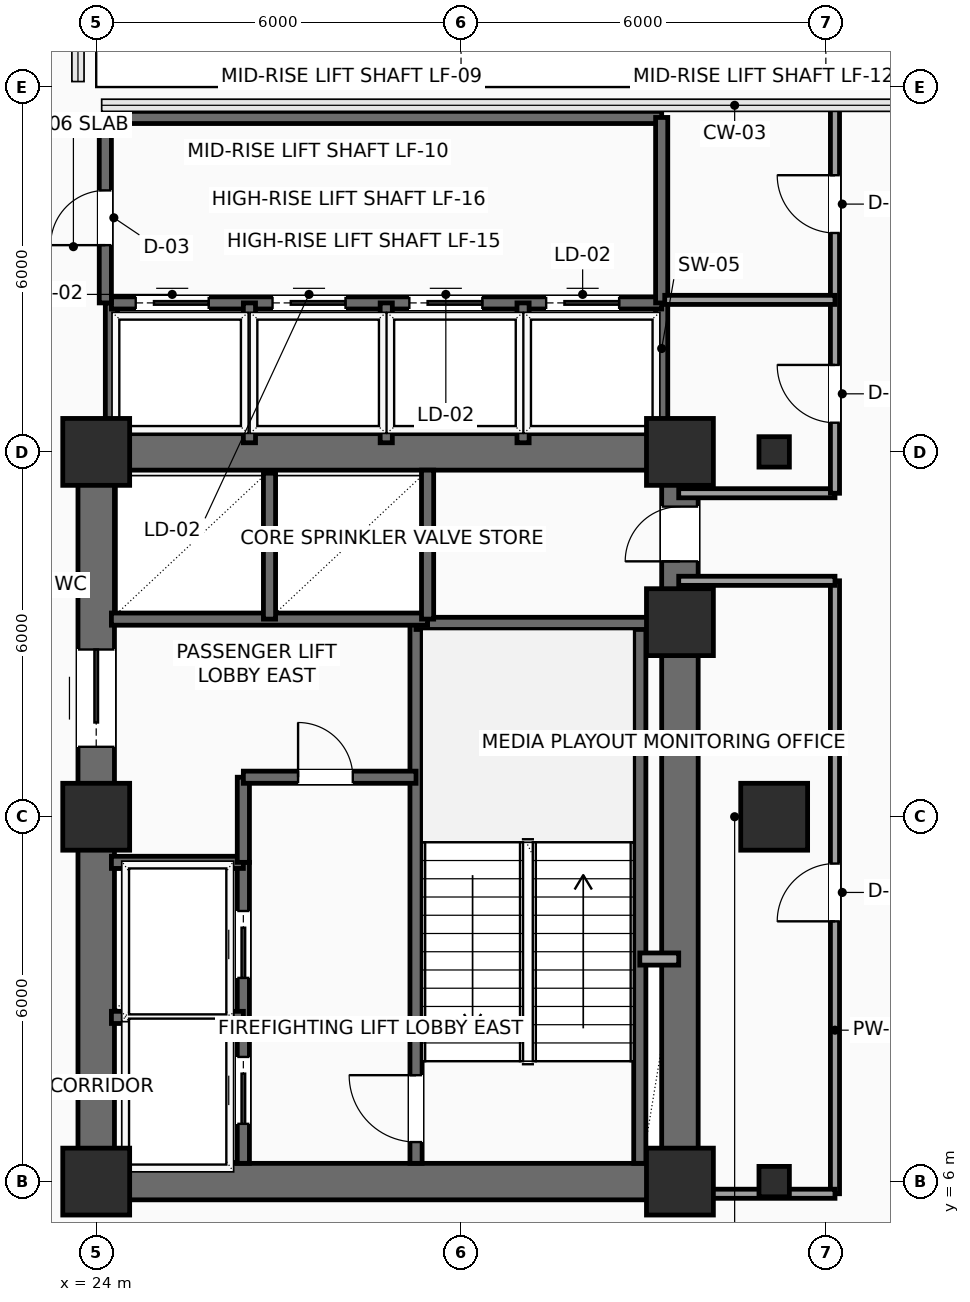
"""IFC4 building model, lengths in metres.
Left out: names, types, materials, properties, quantities, classifications, styles, units other than length and angle.
Written with IfcOpenShell. Run it as: python <this file> out.ifc"""

import sys

from ifc_helpers import new_model, si_unit, direction, frame, frame_2d, origin, origin_2d, place, context, subcontext, project, spatial, rectangle, hollow_rectangle, extrude, element, fill, save


model = new_model("IFC4")
c1 = context("Model", 3, precision=1e-05, world=origin(), true_north=direction((0.0, 1.0)))
c2 = subcontext(c1, "Body", "Model", "MODEL_VIEW")
j1 = project(units=[si_unit("LENGTHUNIT", "METRE"), si_unit("PLANEANGLEUNIT", "RADIAN")], contexts=[c1])
p1 = place(None, origin())
s1 = spatial("IfcSite", under=j1, at=p1, CompositionType="ELEMENT")
p2 = place(p1, origin())
s2 = spatial("IfcBuilding", under=s1, at=p2, CompositionType="ELEMENT")
p3 = place(p2, frame((0.0, 0.0, 156.9)))
s3 = spatial("IfcBuildingStorey", under=s2, at=p3, CompositionType="ELEMENT", Elevation=156.9)
for number, where, z_axis, x_axis in (
    (1, (24.0, 6.0, 0.0), (0.0, 0.0, 1.0), (1.0, 0.0, 0.0)),
    (2, (24.0, 12.0, 0.0), (0.0, 0.0, 1.0), (1.0, 0.0, 0.0)),
    (3, (24.0, 18.0, 0.0), (0.0, 0.0, 1.0), (1.0, 0.0, 0.0)),
    (4, (33.6, 6.0, 0.0), (0.0, 0.0, 1.0), (1.0, 0.0, 0.0)),
    (5, (33.6, 15.2, 0.0), (0.0, 0.0, 1.0), (1.0, 0.0, 0.0)),
    (6, (33.6, 18.0, 0.0), (0.0, 0.0, 1.0), (1.0, 0.0, 0.0)),
):
    element("IfcColumn", number, at=place(p3, frame(where, z_axis=z_axis, x_axis=x_axis)), inside=s3, PredefinedType="COLUMN", context=c2, shape_type="SweptSolid", body=[
        extrude(rectangle(XDim=1.1, YDim=1.1, at=origin_2d()), origin(), (0.0, 0.0, 1.0), 3.75),
    ])
p4 = place(p3, frame((35.15, 6.0, 0.0), z_axis=(0.0, 0.0, 1.0), x_axis=(1.0, 0.0, 0.0)))
e7 = element("IfcColumn", 7, at=p4, inside=s3, PredefinedType="COLUMN", context=c2, shape_type="SweptSolid", body=[
    extrude(hollow_rectangle(XDim=0.5, YDim=0.5, WallThickness=0.025, InnerFilletRadius=0.025, OuterFilletRadius=0.04, at=origin_2d()), origin(), (0.0, 0.0, 1.0), 3.75),
])
p5 = place(p3, frame((35.15, 12.0, 0.0), z_axis=(0.0, 0.0, 1.0), x_axis=(1.0, 0.0, 0.0)))
e8 = element("IfcColumn", 8, at=p5, inside=s3, PredefinedType="COLUMN", context=c2, shape_type="SweptSolid", body=[
    extrude(rectangle(XDim=1.1, YDim=1.1, at=origin_2d()), origin(), (0.0, 0.0, 1.0), 3.75),
])
p6 = place(p3, frame((35.15, 18.0, 0.0), z_axis=(0.0, 0.0, 1.0), x_axis=(1.0, 0.0, 0.0)))
e9 = element("IfcColumn", 9, at=p6, inside=s3, PredefinedType="COLUMN", context=c2, shape_type="SweptSolid", body=[
    extrude(hollow_rectangle(XDim=0.5, YDim=0.5, WallThickness=0.025, InnerFilletRadius=0.025, OuterFilletRadius=0.04, at=origin_2d()), origin(), (0.0, 0.0, 1.0), 3.75),
])
for number, where, z_axis, x_axis in (
    (10, (24.0, 6.0, 0.0), (0.0, 0.0, 1.0), (1.0, 0.0, 0.0)),
    (11, (24.0, 18.0, 0.0), (0.0, 0.0, 1.0), (1.0, 0.0, 0.0)),
):
    element("IfcWall", number, at=place(p3, frame(where, z_axis=z_axis, x_axis=x_axis)), inside=s3, PredefinedType="SHEAR", context=c2, shape_type="SweptSolid", body=[
        extrude(rectangle(XDim=9.6, YDim=0.6, at=frame_2d((4.8, 0.0))), origin(), (0.0, 0.0, 1.0), 3.525),
    ])
p7 = place(p3, frame((24.0, 6.0, 0.0), z_axis=(0.0, 0.0, 1.0), x_axis=(0.0, 1.0, 0.0)))
e12 = element("IfcWall", 12, at=p7, inside=s3, PredefinedType="SHEAR", context=c2, shape_type="SweptSolid", body=[
    extrude(rectangle(XDim=12.0, YDim=0.6, at=frame_2d((6.0, 0.0))), origin(), (0.0, 0.0, 1.0), 3.525),
])
p8 = place(p7, frame((7.15, 0.0, 0.0)))
e13 = element("IfcOpeningElement", 13, at=p8, cuts=e12, PredefinedType="OPENING", context=c2, shape_type="SweptSolid", body=[
    extrude(rectangle(XDim=1.6, YDim=2.3, at=frame_2d((0.8, 1.15))), frame((0.0, 0.31, 0.0), z_axis=(0.0, -1.0, 0.0), x_axis=(1.0, 0.0, 0.0)), (0.0, 0.0, 1.0), 0.62),
])
p9 = place(p3, frame((33.6, 6.0, 0.0), z_axis=(0.0, 0.0, 1.0), x_axis=(0.0, 1.0, 0.0)))
e14 = element("IfcWall", 14, at=p9, inside=s3, PredefinedType="SHEAR", context=c2, shape_type="SweptSolid", body=[
    extrude(rectangle(XDim=12.0, YDim=0.6, at=frame_2d((6.0, 0.0))), origin(), (0.0, 0.0, 1.0), 3.525),
])
p10 = place(p9, frame((10.2, 0.0, 0.0)))
e15 = element("IfcOpeningElement", 15, at=p10, cuts=e14, PredefinedType="OPENING", context=c2, shape_type="SweptSolid", body=[
    extrude(rectangle(XDim=0.9, YDim=2.15, at=frame_2d((0.45, 1.075))), frame((0.0, 0.31, 0.0), z_axis=(0.0, -1.0, 0.0), x_axis=(1.0, 0.0, 0.0)), (0.0, 0.0, 1.0), 0.62),
])
p11 = place(p3, frame((29.26, 6.3, 0.0), z_axis=(0.0, 0.0, 1.0), x_axis=(0.0, 1.0, 0.0)))
e16 = element("IfcWall", 16, at=p11, inside=s3, PredefinedType="SHEAR", context=c2, shape_type="SweptSolid", body=[
    extrude(rectangle(XDim=8.88, YDim=0.2, at=frame_2d((4.44, 0.0))), origin(), (0.0, 0.0, 1.0), 3.525),
])
p12 = place(p11, frame((0.35, 0.0, 0.0)))
e17 = element("IfcOpeningElement", 17, at=p12, cuts=e16, PredefinedType="OPENING", context=c2, shape_type="SweptSolid", body=[
    extrude(rectangle(XDim=1.1, YDim=2.2, at=frame_2d((0.55, 1.1))), frame((0.0, 0.11, 0.0), z_axis=(0.0, -1.0, 0.0), x_axis=(1.0, 0.0, 0.0)), (0.0, 0.0, 1.0), 0.22),
])
p13 = place(p3, frame((32.94, 6.3, 0.0), z_axis=(0.0, 0.0, 1.0), x_axis=(0.0, 1.0, 0.0)))
e18 = element("IfcWall", 18, at=p13, inside=s3, PredefinedType="SHEAR", context=c2, shape_type="SweptSolid", body=[
    extrude(rectangle(XDim=8.88, YDim=0.2, at=frame_2d((4.44, 0.0))), origin(), (0.0, 0.0, 1.0), 3.525),
])
p14 = place(p3, frame((29.26, 15.18, 0.0), z_axis=(0.0, 0.0, 1.0), x_axis=(1.0, 0.0, 0.0)))
e19 = element("IfcWall", 19, at=p14, inside=s3, PredefinedType="SHEAR", context=c2, shape_type="SweptSolid", body=[
    extrude(rectangle(XDim=4.04, YDim=0.2, at=frame_2d((2.02, 0.0))), origin(), (0.0, 0.0, 1.0), 3.525),
])
p15 = place(p3, frame((26.42, 6.3, 0.0), z_axis=(0.0, 0.0, 1.0), x_axis=(0.0, 1.0, 0.0)))
e20 = element("IfcWall", 20, at=p15, inside=s3, PredefinedType="SHEAR", context=c2, shape_type="SweptSolid", body=[
    extrude(rectangle(XDim=4.95, YDim=0.2, at=frame_2d((2.475, 0.0))), origin(), (0.0, 0.0, 1.0), 3.525),
])
p16 = place(p15, frame((0.65, 0.0, 0.0)))
e21 = element("IfcOpeningElement", 21, at=p16, cuts=e20, PredefinedType="OPENING", context=c2, shape_type="SweptSolid", body=[
    extrude(rectangle(XDim=1.1, YDim=2.2, at=frame_2d((0.55, 1.1))), frame((0.0, 0.11, 0.0), z_axis=(0.0, -1.0, 0.0), x_axis=(1.0, 0.0, 0.0)), (0.0, 0.0, 1.0), 0.22),
])
p17 = place(p15, frame((3.05, 0.0, 0.0)))
e22 = element("IfcOpeningElement", 22, at=p17, cuts=e20, PredefinedType="OPENING", context=c2, shape_type="SweptSolid", body=[
    extrude(rectangle(XDim=1.1, YDim=2.2, at=frame_2d((0.55, 1.1))), frame((0.0, 0.11, 0.0), z_axis=(0.0, -1.0, 0.0), x_axis=(1.0, 0.0, 0.0)), (0.0, 0.0, 1.0), 0.22),
])
for number, where, z_axis, x_axis in (
    (23, (24.25, 8.7, 0.0), (0.0, 0.0, 1.0), (1.0, 0.0, 0.0)),
    (24, (24.25, 11.25, 0.0), (0.0, 0.0, 1.0), (1.0, 0.0, 0.0)),
):
    element("IfcWall", number, at=place(p3, frame(where, z_axis=z_axis, x_axis=x_axis)), inside=s3, PredefinedType="SHEAR", context=c2, shape_type="SweptSolid", body=[
        extrude(rectangle(XDim=2.17, YDim=0.2, at=frame_2d((1.085, 0.0))), origin(), (0.0, 0.0, 1.0), 3.525),
    ])
p18 = place(p3, frame((26.42, 11.25, 0.0), z_axis=(0.0, 0.0, 1.0), x_axis=(0.0, 1.0, 0.0)))
e25 = element("IfcWall", 25, at=p18, inside=s3, PredefinedType="SHEAR", context=c2, shape_type="SweptSolid", body=[
    extrude(rectangle(XDim=1.4, YDim=0.2, at=frame_2d((0.7, 0.0))), origin(), (0.0, 0.0, 1.0), 3.525),
])
p19 = place(p3, frame((26.42, 12.65, 0.0), z_axis=(0.0, 0.0, 1.0), x_axis=(1.0, 0.0, 0.0)))
e26 = element("IfcWall", 26, at=p19, inside=s3, PredefinedType="SHEAR", context=c2, shape_type="SweptSolid", body=[
    extrude(rectangle(XDim=2.84, YDim=0.2, at=frame_2d((1.42, 0.0))), origin(), (0.0, 0.0, 1.0), 3.525),
])
p20 = place(p19, frame((0.9, 0.0, 0.0)))
e27 = element("IfcOpeningElement", 27, at=p20, cuts=e26, PredefinedType="OPENING", context=c2, shape_type="SweptSolid", body=[
    extrude(rectangle(XDim=0.9, YDim=2.15, at=frame_2d((0.45, 1.075))), frame((0.0, 0.11, 0.0), z_axis=(0.0, -1.0, 0.0), x_axis=(1.0, 0.0, 0.0)), (0.0, 0.0, 1.0), 0.22),
])
p21 = place(p3, frame((32.94, 9.66, 0.0), z_axis=(0.0, 0.0, 1.0), x_axis=(1.0, 0.0, 0.0)))
e28 = element("IfcWall", 28, at=p21, inside=s3, PredefinedType="SOLIDWALL", context=c2, shape_type="SweptSolid", body=[
    extrude(rectangle(XDim=0.64, YDim=0.2, at=frame_2d((0.32, 0.0))), origin(), (0.0, 0.0, 1.0), 3.525),
])
p22 = place(p3, frame((24.25, 15.25, 0.0), z_axis=(0.0, 0.0, 1.0), x_axis=(1.0, 0.0, 0.0)))
e29 = element("IfcWall", 29, at=p22, inside=s3, PredefinedType="SHEAR", context=c2, shape_type="SweptSolid", body=[
    extrude(rectangle(XDim=5.2, YDim=0.2, at=frame_2d((2.6, 0.0))), origin(), (0.0, 0.0, 1.0), 3.525),
])
p23 = place(p3, frame((26.85, 15.25, 0.0), z_axis=(0.0, 0.0, 1.0), x_axis=(0.0, 1.0, 0.0)))
e30 = element("IfcWall", 30, at=p23, inside=s3, PredefinedType="SHEAR", context=c2, shape_type="SweptSolid", body=[
    extrude(rectangle(XDim=2.4, YDim=0.2, at=frame_2d((1.2, 0.0))), origin(), (0.0, 0.0, 1.0), 3.525),
])
p24 = place(p3, frame((29.45, 15.25, 0.0), z_axis=(0.0, 0.0, 1.0), x_axis=(0.0, 1.0, 0.0)))
e31 = element("IfcWall", 31, at=p24, inside=s3, PredefinedType="SHEAR", context=c2, shape_type="SweptSolid", body=[
    extrude(rectangle(XDim=2.45, YDim=0.2, at=frame_2d((1.225, 0.0))), origin(), (0.0, 0.0, 1.0), 3.525),
])
for number, where, z_axis, x_axis in (
    (32, (33.3, 18.1, 0.0), (0.0, 0.0, 1.0), (0.0, 1.0, 0.0)),
    (33, (24.25, 18.1, 0.0), (0.0, 0.0, 1.0), (0.0, 1.0, 0.0)),
):
    element("IfcWall", number, at=place(p3, frame(where, z_axis=z_axis, x_axis=x_axis)), inside=s3, PredefinedType="SHEAR", context=c2, shape_type="SweptSolid", body=[
        extrude(rectangle(XDim=2.35, YDim=0.2, at=frame_2d((1.175, 0.0))), origin(), (0.0, 0.0, 1.0), 3.525),
    ])
p25 = place(p3, frame((24.25, 20.45, 0.0), z_axis=(0.0, 0.0, 1.0), x_axis=(1.0, 0.0, 0.0)))
e34 = element("IfcWall", 34, at=p25, inside=s3, PredefinedType="SHEAR", context=c2, shape_type="SweptSolid", body=[
    extrude(rectangle(XDim=9.05, YDim=0.2, at=frame_2d((4.525, 0.0))), origin(), (0.0, 0.0, 1.0), 3.525),
])
p26 = place(p25, frame((0.4, 0.0, 0.0)))
e35 = element("IfcOpeningElement", 35, at=p26, cuts=e34, PredefinedType="OPENING", context=c2, shape_type="SweptSolid", body=[
    extrude(rectangle(XDim=1.2, YDim=2.2, at=frame_2d((0.6, 1.1))), frame((0.0, 0.11, 0.0), z_axis=(0.0, -1.0, 0.0), x_axis=(1.0, 0.0, 0.0)), (0.0, 0.0, 1.0), 0.22),
])
p27 = place(p25, frame((2.65, 0.0, 0.0)))
e36 = element("IfcOpeningElement", 36, at=p27, cuts=e34, PredefinedType="OPENING", context=c2, shape_type="SweptSolid", body=[
    extrude(rectangle(XDim=1.2, YDim=2.2, at=frame_2d((0.6, 1.1))), frame((0.0, 0.11, 0.0), z_axis=(0.0, -1.0, 0.0), x_axis=(1.0, 0.0, 0.0)), (0.0, 0.0, 1.0), 0.22),
])
p28 = place(p25, frame((4.9, 0.0, 0.0)))
e37 = element("IfcOpeningElement", 37, at=p28, cuts=e34, PredefinedType="OPENING", context=c2, shape_type="SweptSolid", body=[
    extrude(rectangle(XDim=1.2, YDim=2.2, at=frame_2d((0.6, 1.1))), frame((0.0, 0.11, 0.0), z_axis=(0.0, -1.0, 0.0), x_axis=(1.0, 0.0, 0.0)), (0.0, 0.0, 1.0), 0.22),
])
p29 = place(p25, frame((7.15, 0.0, 0.0)))
e38 = element("IfcOpeningElement", 38, at=p29, cuts=e34, PredefinedType="OPENING", context=c2, shape_type="SweptSolid", body=[
    extrude(rectangle(XDim=1.2, YDim=2.2, at=frame_2d((0.6, 1.1))), frame((0.0, 0.11, 0.0), z_axis=(0.0, -1.0, 0.0), x_axis=(1.0, 0.0, 0.0)), (0.0, 0.0, 1.0), 0.22),
])
for number, where, z_axis, x_axis in (
    (39, (26.52, 18.15, 0.0), (0.0, 0.0, 1.0), (0.0, 1.0, 0.0)),
    (40, (28.77, 18.15, 0.0), (0.0, 0.0, 1.0), (0.0, 1.0, 0.0)),
    (41, (31.02, 18.15, 0.0), (0.0, 0.0, 1.0), (0.0, 1.0, 0.0)),
):
    element("IfcWall", number, at=place(p3, frame(where, z_axis=z_axis, x_axis=x_axis)), inside=s3, PredefinedType="SHEAR", context=c2, shape_type="SweptSolid", body=[
        extrude(rectangle(XDim=2.3, YDim=0.2, at=frame_2d((1.15, 0.0))), origin(), (0.0, 0.0, 1.0), 3.525),
    ])
p30 = place(p3, frame((24.15, 23.5, 0.0), z_axis=(0.0, 0.0, 1.0), x_axis=(1.0, 0.0, 0.0)))
e42 = element("IfcWall", 42, at=p30, inside=s3, PredefinedType="SHEAR", context=c2, shape_type="SweptSolid", body=[
    extrude(rectangle(XDim=9.15, YDim=0.2, at=frame_2d((4.575, 0.0))), origin(), (0.0, 0.0, 1.0), 3.525),
])
p31 = place(p3, frame((33.3, 20.45, 0.0), z_axis=(0.0, 0.0, 1.0), x_axis=(0.0, 1.0, 0.0)))
e43 = element("IfcWall", 43, at=p31, inside=s3, PredefinedType="SHEAR", context=c2, shape_type="SweptSolid", body=[
    extrude(rectangle(XDim=3.05, YDim=0.2, at=frame_2d((1.525, 0.0))), origin(), (0.0, 0.0, 1.0), 3.525),
])
p32 = place(p3, frame((24.15, 20.45, 0.0), z_axis=(0.0, 0.0, 1.0), x_axis=(0.0, 1.0, 0.0)))
e44 = element("IfcWall", 44, at=p32, inside=s3, PredefinedType="SHEAR", context=c2, shape_type="SweptSolid", body=[
    extrude(rectangle(XDim=3.05, YDim=0.2, at=frame_2d((1.525, 0.0))), origin(), (0.0, 0.0, 1.0), 3.525),
])
p33 = place(p32, frame((0.95, 0.0, 0.0)))
e45 = element("IfcOpeningElement", 45, at=p33, cuts=e44, PredefinedType="OPENING", context=c2, shape_type="SweptSolid", body=[
    extrude(rectangle(XDim=0.9, YDim=2.15, at=frame_2d((0.45, 1.075))), frame((0.0, 0.11, 0.0), z_axis=(0.0, -1.0, 0.0), x_axis=(1.0, 0.0, 0.0)), (0.0, 0.0, 1.0), 0.22),
])
p34 = place(p3, frame((36.15, 5.8, 0.0), z_axis=(0.0, 0.0, 1.0), x_axis=(0.0, 1.0, 0.0)))
e46 = element("IfcWall", 46, at=p34, inside=s3, PredefinedType="PARTITIONING", context=c2, shape_type="SweptSolid", body=[
    extrude(rectangle(XDim=10.08, YDim=0.15, at=frame_2d((5.04, 0.0))), origin(), (0.0, 0.0, 1.0), 3.525),
])
p35 = place(p34, frame((4.48, 0.0, 0.0)))
e47 = element("IfcOpeningElement", 47, at=p35, cuts=e46, PredefinedType="OPENING", context=c2, shape_type="SweptSolid", body=[
    extrude(rectangle(XDim=0.95, YDim=2.15, at=frame_2d((0.475, 1.075))), frame((0.0, 0.085, 0.0), z_axis=(0.0, -1.0, 0.0), x_axis=(1.0, 0.0, 0.0)), (0.0, 0.0, 1.0), 0.17),
])
for number, where, z_axis, x_axis in (
    (48, (36.15, 15.88, 0.0), (0.0, 0.0, 1.0), (-1.0, 0.0, 0.0)),
    (49, (33.58, 17.32, 0.0), (0.0, 0.0, 1.0), (1.0, 0.0, 0.0)),
):
    element("IfcWall", number, at=place(p3, frame(where, z_axis=z_axis, x_axis=x_axis)), inside=s3, PredefinedType="PARTITIONING", context=c2, shape_type="SweptSolid", body=[
        extrude(rectangle(XDim=2.57, YDim=0.15, at=frame_2d((1.285, 0.0))), origin(), (0.0, 0.0, 1.0), 3.525),
    ])
p36 = place(p3, frame((36.15, 17.32, 0.0), z_axis=(0.0, 0.0, 1.0), x_axis=(0.0, 1.0, 0.0)))
e50 = element("IfcWall", 50, at=p36, inside=s3, PredefinedType="PARTITIONING", context=c2, shape_type="SweptSolid", body=[
    extrude(rectangle(XDim=6.38, YDim=0.15, at=frame_2d((3.19, 0.0))), origin(), (0.0, 0.0, 1.0), 3.525),
])
p37 = place(p36, frame((1.16, 0.0, 0.0)))
e51 = element("IfcOpeningElement", 51, at=p37, cuts=e50, PredefinedType="OPENING", context=c2, shape_type="SweptSolid", body=[
    extrude(rectangle(XDim=0.95, YDim=2.15, at=frame_2d((0.475, 1.075))), frame((0.0, 0.085, 0.0), z_axis=(0.0, -1.0, 0.0), x_axis=(1.0, 0.0, 0.0)), (0.0, 0.0, 1.0), 0.17),
])
p38 = place(p36, frame((4.28, 0.0, 0.0)))
e52 = element("IfcOpeningElement", 52, at=p38, cuts=e50, PredefinedType="OPENING", context=c2, shape_type="SweptSolid", body=[
    extrude(rectangle(XDim=0.95, YDim=2.15, at=frame_2d((0.475, 1.075))), frame((0.0, 0.085, 0.0), z_axis=(0.0, -1.0, 0.0), x_axis=(1.0, 0.0, 0.0)), (0.0, 0.0, 1.0), 0.17),
])
p39 = place(p3, frame((33.65, 5.8, 0.0), z_axis=(0.0, 0.0, 1.0), x_axis=(1.0, 0.0, 0.0)))
e53 = element("IfcWall", 53, at=p39, inside=s3, PredefinedType="PARTITIONING", context=c2, shape_type="SweptSolid", body=[
    extrude(rectangle(XDim=2.5, YDim=0.15, at=frame_2d((1.25, 0.0))), origin(), (0.0, 0.0, 1.0), 3.017),
])
p40 = place(p3, frame((33.35, 20.5, 0.0), z_axis=(0.0, 0.0, 1.0), x_axis=(1.0, 0.0, 0.0)))
e54 = element("IfcWall", 54, at=p40, inside=s3, PredefinedType="PARTITIONING", context=c2, shape_type="SweptSolid", body=[
    extrude(rectangle(XDim=2.8, YDim=0.15, at=frame_2d((1.4, 0.0))), origin(), (0.0, 0.0, 1.0), 3.525),
])
p41 = place(p8, origin())
e55 = element("IfcDoor", 55, at=p41, inside=s3, OperationType="DOUBLE_DOOR_SLIDING", PredefinedType="DOOR", context=c2, shape_type="SweptSolid", body=[
    extrude(rectangle(XDim=1.6, YDim=2.3, at=frame_2d((0.8, 1.15))), frame((0.0, 0.025, 0.0), z_axis=(0.0, -1.0, 0.0), x_axis=(1.0, 0.0, 0.0)), (0.0, 0.0, 1.0), 0.05),
])
fill(e13, e55)
p42 = place(p10, origin())
e56 = element("IfcDoor", 56, at=p42, inside=s3, OperationType="SINGLE_SWING_LEFT", PredefinedType="DOOR", context=c2, shape_type="SweptSolid", body=[
    extrude(rectangle(XDim=0.9, YDim=2.15, at=frame_2d((0.45, 1.075))), frame((0.0, 0.025, 0.0), z_axis=(0.0, -1.0, 0.0), x_axis=(1.0, 0.0, 0.0)), (0.0, 0.0, 1.0), 0.05),
])
fill(e15, e56)
p43 = place(p12, origin())
e57 = element("IfcDoor", 57, at=p43, inside=s3, OperationType="SINGLE_SWING_RIGHT", PredefinedType="DOOR", context=c2, shape_type="SweptSolid", body=[
    extrude(rectangle(XDim=1.1, YDim=2.2, at=frame_2d((0.55, 1.1))), frame((0.0, 0.025, 0.0), z_axis=(0.0, -1.0, 0.0), x_axis=(1.0, 0.0, 0.0)), (0.0, 0.0, 1.0), 0.05),
])
fill(e17, e57)
p44 = place(p16, origin())
e58 = element("IfcDoor", 58, at=p44, inside=s3, OperationType="SLIDING_TO_LEFT", PredefinedType="DOOR", context=c2, shape_type="SweptSolid", body=[
    extrude(rectangle(XDim=1.1, YDim=2.2, at=frame_2d((0.55, 1.1))), frame((0.0, 0.025, 0.0), z_axis=(0.0, -1.0, 0.0), x_axis=(1.0, 0.0, 0.0)), (0.0, 0.0, 1.0), 0.05),
])
fill(e21, e58)
p45 = place(p17, origin())
e59 = element("IfcDoor", 59, at=p45, inside=s3, OperationType="SLIDING_TO_LEFT", PredefinedType="DOOR", context=c2, shape_type="SweptSolid", body=[
    extrude(rectangle(XDim=1.1, YDim=2.2, at=frame_2d((0.55, 1.1))), frame((0.0, 0.025, 0.0), z_axis=(0.0, -1.0, 0.0), x_axis=(1.0, 0.0, 0.0)), (0.0, 0.0, 1.0), 0.05),
])
fill(e22, e59)
p46 = place(p20, origin())
e60 = element("IfcDoor", 60, at=p46, inside=s3, OperationType="SINGLE_SWING_LEFT", PredefinedType="DOOR", context=c2, shape_type="SweptSolid", body=[
    extrude(rectangle(XDim=0.9, YDim=2.15, at=frame_2d((0.45, 1.075))), frame((0.0, 0.025, 0.0), z_axis=(0.0, -1.0, 0.0), x_axis=(1.0, 0.0, 0.0)), (0.0, 0.0, 1.0), 0.05),
])
fill(e27, e60)
p47 = place(p26, origin())
e61 = element("IfcDoor", 61, at=p47, inside=s3, OperationType="SLIDING_TO_RIGHT", PredefinedType="DOOR", context=c2, shape_type="SweptSolid", body=[
    extrude(rectangle(XDim=1.2, YDim=2.2, at=frame_2d((0.6, 1.1))), frame((0.0, 0.025, 0.0), z_axis=(0.0, -1.0, 0.0), x_axis=(1.0, 0.0, 0.0)), (0.0, 0.0, 1.0), 0.05),
])
fill(e35, e61)
p48 = place(p27, origin())
e62 = element("IfcDoor", 62, at=p48, inside=s3, OperationType="SLIDING_TO_RIGHT", PredefinedType="DOOR", context=c2, shape_type="SweptSolid", body=[
    extrude(rectangle(XDim=1.2, YDim=2.2, at=frame_2d((0.6, 1.1))), frame((0.0, 0.025, 0.0), z_axis=(0.0, -1.0, 0.0), x_axis=(1.0, 0.0, 0.0)), (0.0, 0.0, 1.0), 0.05),
])
fill(e36, e62)
p49 = place(p28, origin())
e63 = element("IfcDoor", 63, at=p49, inside=s3, OperationType="SLIDING_TO_RIGHT", PredefinedType="DOOR", context=c2, shape_type="SweptSolid", body=[
    extrude(rectangle(XDim=1.2, YDim=2.2, at=frame_2d((0.6, 1.1))), frame((0.0, 0.025, 0.0), z_axis=(0.0, -1.0, 0.0), x_axis=(1.0, 0.0, 0.0)), (0.0, 0.0, 1.0), 0.05),
])
fill(e37, e63)
p50 = place(p29, origin())
e64 = element("IfcDoor", 64, at=p50, inside=s3, OperationType="SLIDING_TO_RIGHT", PredefinedType="DOOR", context=c2, shape_type="SweptSolid", body=[
    extrude(rectangle(XDim=1.2, YDim=2.2, at=frame_2d((0.6, 1.1))), frame((0.0, 0.025, 0.0), z_axis=(0.0, -1.0, 0.0), x_axis=(1.0, 0.0, 0.0)), (0.0, 0.0, 1.0), 0.05),
])
fill(e38, e64)
p51 = place(p33, origin())
e65 = element("IfcDoor", 65, at=p51, inside=s3, OperationType="SINGLE_SWING_LEFT", PredefinedType="DOOR", context=c2, shape_type="SweptSolid", body=[
    extrude(rectangle(XDim=0.9, YDim=2.15, at=frame_2d((0.45, 1.075))), frame((0.0, 0.025, 0.0), z_axis=(0.0, -1.0, 0.0), x_axis=(1.0, 0.0, 0.0)), (0.0, 0.0, 1.0), 0.05),
])
fill(e45, e65)
p52 = place(p35, origin())
e66 = element("IfcDoor", 66, at=p52, inside=s3, OperationType="SINGLE_SWING_LEFT", PredefinedType="DOOR", context=c2, shape_type="SweptSolid", body=[
    extrude(rectangle(XDim=0.95, YDim=2.15, at=frame_2d((0.475, 1.075))), frame((0.0, 0.025, 0.0), z_axis=(0.0, -1.0, 0.0), x_axis=(1.0, 0.0, 0.0)), (0.0, 0.0, 1.0), 0.05),
])
fill(e47, e66)
p53 = place(p37, origin())
e67 = element("IfcDoor", 67, at=p53, inside=s3, OperationType="SINGLE_SWING_RIGHT", PredefinedType="DOOR", context=c2, shape_type="SweptSolid", body=[
    extrude(rectangle(XDim=0.95, YDim=2.15, at=frame_2d((0.475, 1.075))), frame((0.0, 0.025, 0.0), z_axis=(0.0, -1.0, 0.0), x_axis=(1.0, 0.0, 0.0)), (0.0, 0.0, 1.0), 0.05),
])
fill(e51, e67)
p54 = place(p38, origin())
e68 = element("IfcDoor", 68, at=p54, inside=s3, OperationType="SINGLE_SWING_RIGHT", PredefinedType="DOOR", context=c2, shape_type="SweptSolid", body=[
    extrude(rectangle(XDim=0.95, YDim=2.15, at=frame_2d((0.475, 1.075))), frame((0.0, 0.025, 0.0), z_axis=(0.0, -1.0, 0.0), x_axis=(1.0, 0.0, 0.0)), (0.0, 0.0, 1.0), 0.05),
])
fill(e52, e68)
save(model, sys.argv[1])
